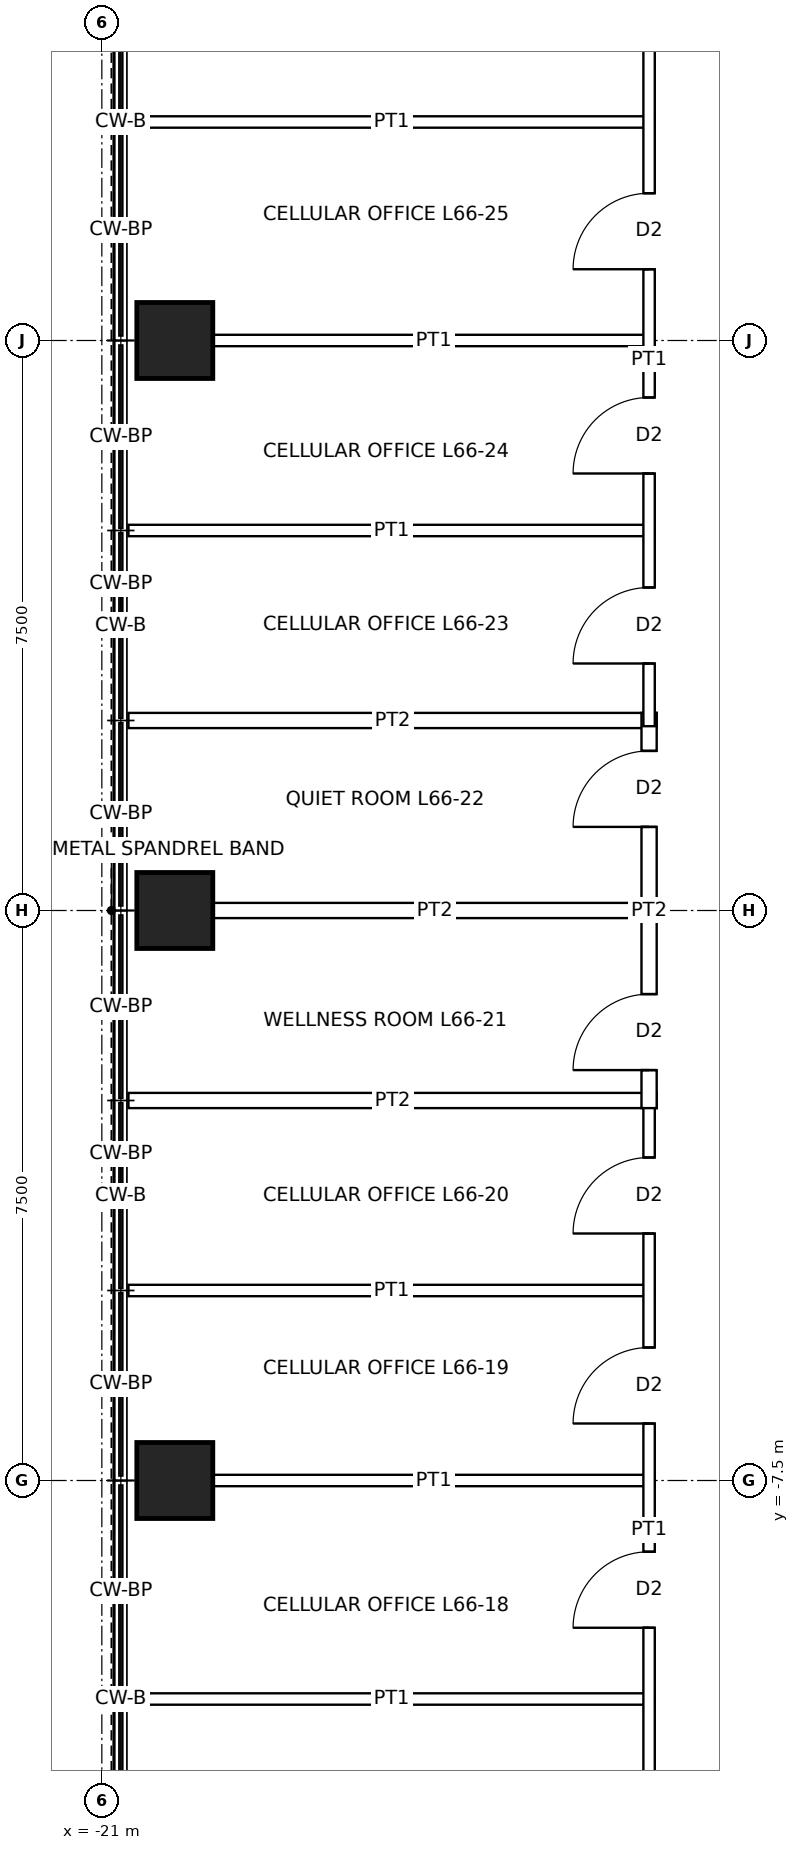
"""IFC4 building model, lengths in metres.
Left out: names, types, materials, properties, quantities, classifications, styles, units other than length and angle.
Written with IfcOpenShell. Run it as: python <this file> out.ifc"""

import sys

from ifc_helpers import new_model, si_unit, direction, frame, frame_2d, origin, origin_2d, place, context, subcontext, project, spatial, rectangle, hollow_rectangle, extrude, element, fill, save


model = new_model("IFC4")
c1 = context("Model", 3, precision=1e-05, world=origin(), true_north=direction((0.0, 1.0)))
c2 = subcontext(c1, "Body", "Model", "MODEL_VIEW")
j1 = project(units=[si_unit("LENGTHUNIT", "METRE"), si_unit("PLANEANGLEUNIT", "RADIAN")], contexts=[c1])
p1 = place(None, origin())
s1 = spatial("IfcSite", under=j1, at=p1, CompositionType="ELEMENT")
p2 = place(p1, origin())
s2 = spatial("IfcBuilding", under=s1, at=p2, CompositionType="ELEMENT")
p3 = place(p2, frame((0.0, 0.0, 299.9)))
s3 = spatial("IfcBuildingStorey", under=s2, at=p3, CompositionType="ELEMENT", Elevation=299.9)
for number, where, z_axis, x_axis in (
    (1, (-20.04, -7.5, 0.0), (0.0, 0.0, 1.0), (1.0, 0.0, 0.0)),
    (2, (-20.04, 0.0, 0.0), (0.0, 0.0, 1.0), (1.0, 0.0, 0.0)),
    (3, (-20.04, 7.5, 0.0), (0.0, 0.0, 1.0), (1.0, 0.0, 0.0)),
):
    element("IfcColumn", number, at=place(p3, frame(where, z_axis=z_axis, x_axis=x_axis)), inside=s3, PredefinedType="COLUMN", context=c2, shape_type="SweptSolid", body=[
        extrude(hollow_rectangle(XDim=1.0, YDim=1.0, WallThickness=0.075, at=origin_2d()), origin(), (0.0, 0.0, 1.0), 4.0),
    ])
p4 = place(p3, frame((-20.65, -10.375, 0.0), z_axis=(0.0, 0.0, 1.0), x_axis=(1.0, 0.0, 0.0)))
e4 = element("IfcWall", 4, at=p4, inside=s3, PredefinedType="PARTITIONING", context=c2, shape_type="SweptSolid", body=[
    extrude(rectangle(XDim=6.925, YDim=0.15, at=frame_2d((3.462, 0.0))), origin(), (0.0, 0.0, 1.0), 3.85),
])
p5 = place(p3, frame((-19.54, -7.5, 0.0), z_axis=(0.0, 0.0, 1.0), x_axis=(1.0, 0.0, 0.0)))
e5 = element("IfcWall", 5, at=p5, inside=s3, PredefinedType="PARTITIONING", context=c2, shape_type="SweptSolid", body=[
    extrude(rectangle(XDim=5.815, YDim=0.15, at=frame_2d((2.907, 0.0))), origin(), (0.0, 0.0, 1.0), 3.243),
])
p6 = place(p3, frame((-20.65, -5.0, 0.0), z_axis=(0.0, 0.0, 1.0), x_axis=(1.0, 0.0, 0.0)))
e6 = element("IfcWall", 6, at=p6, inside=s3, PredefinedType="PARTITIONING", context=c2, shape_type="SweptSolid", body=[
    extrude(rectangle(XDim=6.925, YDim=0.15, at=frame_2d((3.462, 0.0))), origin(), (0.0, 0.0, 1.0), 3.85),
])
p7 = place(p3, frame((-20.65, -2.5, 0.0), z_axis=(0.0, 0.0, 1.0), x_axis=(1.0, 0.0, 0.0)))
e7 = element("IfcWall", 7, at=p7, inside=s3, PredefinedType="PARTITIONING", context=c2, shape_type="SweptSolid", body=[
    extrude(rectangle(XDim=6.95, YDim=0.2, at=frame_2d((3.475, 0.0))), origin(), (0.0, 0.0, 1.0), 3.85),
])
p8 = place(p3, frame((-19.54, 0.0, 0.0), z_axis=(0.0, 0.0, 1.0), x_axis=(1.0, 0.0, 0.0)))
e8 = element("IfcWall", 8, at=p8, inside=s3, PredefinedType="PARTITIONING", context=c2, shape_type="SweptSolid", body=[
    extrude(rectangle(XDim=5.84, YDim=0.2, at=frame_2d((2.92, 0.0))), origin(), (0.0, 0.0, 1.0), 3.243),
])
p9 = place(p3, frame((-20.65, 2.5, 0.0), z_axis=(0.0, 0.0, 1.0), x_axis=(1.0, 0.0, 0.0)))
e9 = element("IfcWall", 9, at=p9, inside=s3, PredefinedType="PARTITIONING", context=c2, shape_type="SweptSolid", body=[
    extrude(rectangle(XDim=6.95, YDim=0.2, at=frame_2d((3.475, 0.0))), origin(), (0.0, 0.0, 1.0), 3.85),
])
p10 = place(p3, frame((-20.65, 5.0, 0.0), z_axis=(0.0, 0.0, 1.0), x_axis=(1.0, 0.0, 0.0)))
e10 = element("IfcWall", 10, at=p10, inside=s3, PredefinedType="PARTITIONING", context=c2, shape_type="SweptSolid", body=[
    extrude(rectangle(XDim=6.925, YDim=0.15, at=frame_2d((3.462, 0.0))), origin(), (0.0, 0.0, 1.0), 3.85),
])
p11 = place(p3, frame((-19.54, 7.5, 0.0), z_axis=(0.0, 0.0, 1.0), x_axis=(1.0, 0.0, 0.0)))
e11 = element("IfcWall", 11, at=p11, inside=s3, PredefinedType="PARTITIONING", context=c2, shape_type="SweptSolid", body=[
    extrude(rectangle(XDim=5.815, YDim=0.15, at=frame_2d((2.907, 0.0))), origin(), (0.0, 0.0, 1.0), 3.243),
])
p12 = place(p3, frame((-20.65, 10.375, 0.0), z_axis=(0.0, 0.0, 1.0), x_axis=(1.0, 0.0, 0.0)))
e12 = element("IfcWall", 12, at=p12, inside=s3, PredefinedType="PARTITIONING", context=c2, shape_type="SweptSolid", body=[
    extrude(rectangle(XDim=6.925, YDim=0.15, at=frame_2d((3.462, 0.0))), origin(), (0.0, 0.0, 1.0), 3.85),
])
p13 = place(p3, frame((-13.8, -13.875, 0.0), z_axis=(0.0, 0.0, 1.0), x_axis=(0.0, 1.0, 0.0)))
e13 = element("IfcWall", 13, at=p13, inside=s3, PredefinedType="PARTITIONING", context=c2, shape_type="SweptSolid", body=[
    extrude(rectangle(XDim=11.45, YDim=0.15, at=frame_2d((5.725, 0.0))), origin(), (0.0, 0.0, 1.0), 3.85),
])
p14 = place(p13, frame((4.438, 0.0, 0.0)))
e14 = element("IfcOpeningElement", 14, at=p14, cuts=e13, PredefinedType="OPENING", context=c2, shape_type="SweptSolid", body=[
    extrude(rectangle(XDim=1.0, YDim=2.1, at=frame_2d((0.5, 1.05))), frame((0.0, 0.085, 0.0), z_axis=(0.0, -1.0, 0.0), x_axis=(1.0, 0.0, 0.0)), (0.0, 0.0, 1.0), 0.17),
])
p15 = place(p13, frame((7.125, 0.0, 0.0)))
e15 = element("IfcOpeningElement", 15, at=p15, cuts=e13, PredefinedType="OPENING", context=c2, shape_type="SweptSolid", body=[
    extrude(rectangle(XDim=1.0, YDim=2.1, at=frame_2d((0.5, 1.05))), frame((0.0, 0.085, 0.0), z_axis=(0.0, -1.0, 0.0), x_axis=(1.0, 0.0, 0.0)), (0.0, 0.0, 1.0), 0.17),
])
p16 = place(p13, frame((9.625, 0.0, 0.0)))
e16 = element("IfcOpeningElement", 16, at=p16, cuts=e13, PredefinedType="OPENING", context=c2, shape_type="SweptSolid", body=[
    extrude(rectangle(XDim=1.0, YDim=2.1, at=frame_2d((0.5, 1.05))), frame((0.0, 0.085, 0.0), z_axis=(0.0, -1.0, 0.0), x_axis=(1.0, 0.0, 0.0)), (0.0, 0.0, 1.0), 0.17),
])
p17 = place(p3, frame((-13.8, -2.6, 0.0), z_axis=(0.0, 0.0, 1.0), x_axis=(0.0, 1.0, 0.0)))
e17 = element("IfcWall", 17, at=p17, inside=s3, PredefinedType="PARTITIONING", context=c2, shape_type="SweptSolid", body=[
    extrude(rectangle(XDim=5.2, YDim=0.2, at=frame_2d((2.6, 0.0))), origin(), (0.0, 0.0, 1.0), 3.85),
])
p18 = place(p17, frame((0.5, 0.0, 0.0)))
e18 = element("IfcOpeningElement", 18, at=p18, cuts=e17, PredefinedType="OPENING", context=c2, shape_type="SweptSolid", body=[
    extrude(rectangle(XDim=1.0, YDim=2.1, at=frame_2d((0.5, 1.05))), frame((0.0, 0.11, 0.0), z_axis=(0.0, -1.0, 0.0), x_axis=(1.0, 0.0, 0.0)), (0.0, 0.0, 1.0), 0.22),
])
p19 = place(p17, frame((3.7, 0.0, 0.0)))
e19 = element("IfcOpeningElement", 19, at=p19, cuts=e17, PredefinedType="OPENING", context=c2, shape_type="SweptSolid", body=[
    extrude(rectangle(XDim=1.0, YDim=2.1, at=frame_2d((0.5, 1.05))), frame((0.0, 0.11, 0.0), z_axis=(0.0, -1.0, 0.0), x_axis=(1.0, 0.0, 0.0)), (0.0, 0.0, 1.0), 0.22),
])
p20 = place(p3, frame((-13.8, 2.425, 0.0), z_axis=(0.0, 0.0, 1.0), x_axis=(0.0, 1.0, 0.0)))
e20 = element("IfcWall", 20, at=p20, inside=s3, PredefinedType="PARTITIONING", context=c2, shape_type="SweptSolid", body=[
    extrude(rectangle(XDim=9.65, YDim=0.15, at=frame_2d((4.825, 0.0))), origin(), (0.0, 0.0, 1.0), 3.85),
])
p21 = place(p20, frame((0.825, 0.0, 0.0)))
e21 = element("IfcOpeningElement", 21, at=p21, cuts=e20, PredefinedType="OPENING", context=c2, shape_type="SweptSolid", body=[
    extrude(rectangle(XDim=1.0, YDim=2.1, at=frame_2d((0.5, 1.05))), frame((0.0, 0.085, 0.0), z_axis=(0.0, -1.0, 0.0), x_axis=(1.0, 0.0, 0.0)), (0.0, 0.0, 1.0), 0.17),
])
p22 = place(p20, frame((3.325, 0.0, 0.0)))
e22 = element("IfcOpeningElement", 22, at=p22, cuts=e20, PredefinedType="OPENING", context=c2, shape_type="SweptSolid", body=[
    extrude(rectangle(XDim=1.0, YDim=2.1, at=frame_2d((0.5, 1.05))), frame((0.0, 0.085, 0.0), z_axis=(0.0, -1.0, 0.0), x_axis=(1.0, 0.0, 0.0)), (0.0, 0.0, 1.0), 0.17),
])
p23 = place(p20, frame((6.012, 0.0, 0.0)))
e23 = element("IfcOpeningElement", 23, at=p23, cuts=e20, PredefinedType="OPENING", context=c2, shape_type="SweptSolid", body=[
    extrude(rectangle(XDim=1.0, YDim=2.1, at=frame_2d((0.5, 1.05))), frame((0.0, 0.085, 0.0), z_axis=(0.0, -1.0, 0.0), x_axis=(1.0, 0.0, 0.0)), (0.0, 0.0, 1.0), 0.17),
])
p24 = place(p14, origin())
e24 = element("IfcDoor", 24, at=p24, inside=s3, OperationType="SINGLE_SWING_LEFT", PredefinedType="DOOR", context=c2, shape_type="SweptSolid", body=[
    extrude(rectangle(XDim=1.0, YDim=2.1, at=frame_2d((0.5, 1.05))), frame((0.0, 0.025, 0.0), z_axis=(0.0, -1.0, 0.0), x_axis=(1.0, 0.0, 0.0)), (0.0, 0.0, 1.0), 0.05),
])
fill(e14, e24)
p25 = place(p15, origin())
e25 = element("IfcDoor", 25, at=p25, inside=s3, OperationType="SINGLE_SWING_LEFT", PredefinedType="DOOR", context=c2, shape_type="SweptSolid", body=[
    extrude(rectangle(XDim=1.0, YDim=2.1, at=frame_2d((0.5, 1.05))), frame((0.0, 0.025, 0.0), z_axis=(0.0, -1.0, 0.0), x_axis=(1.0, 0.0, 0.0)), (0.0, 0.0, 1.0), 0.05),
])
fill(e15, e25)
p26 = place(p16, origin())
e26 = element("IfcDoor", 26, at=p26, inside=s3, OperationType="SINGLE_SWING_LEFT", PredefinedType="DOOR", context=c2, shape_type="SweptSolid", body=[
    extrude(rectangle(XDim=1.0, YDim=2.1, at=frame_2d((0.5, 1.05))), frame((0.0, 0.025, 0.0), z_axis=(0.0, -1.0, 0.0), x_axis=(1.0, 0.0, 0.0)), (0.0, 0.0, 1.0), 0.05),
])
fill(e16, e26)
p27 = place(p18, origin())
e27 = element("IfcDoor", 27, at=p27, inside=s3, OperationType="SINGLE_SWING_LEFT", PredefinedType="DOOR", context=c2, shape_type="SweptSolid", body=[
    extrude(rectangle(XDim=1.0, YDim=2.1, at=frame_2d((0.5, 1.05))), frame((0.0, 0.025, 0.0), z_axis=(0.0, -1.0, 0.0), x_axis=(1.0, 0.0, 0.0)), (0.0, 0.0, 1.0), 0.05),
])
fill(e18, e27)
p28 = place(p19, origin())
e28 = element("IfcDoor", 28, at=p28, inside=s3, OperationType="SINGLE_SWING_LEFT", PredefinedType="DOOR", context=c2, shape_type="SweptSolid", body=[
    extrude(rectangle(XDim=1.0, YDim=2.1, at=frame_2d((0.5, 1.05))), frame((0.0, 0.025, 0.0), z_axis=(0.0, -1.0, 0.0), x_axis=(1.0, 0.0, 0.0)), (0.0, 0.0, 1.0), 0.05),
])
fill(e19, e28)
p29 = place(p21, origin())
e29 = element("IfcDoor", 29, at=p29, inside=s3, OperationType="SINGLE_SWING_LEFT", PredefinedType="DOOR", context=c2, shape_type="SweptSolid", body=[
    extrude(rectangle(XDim=1.0, YDim=2.1, at=frame_2d((0.5, 1.05))), frame((0.0, 0.025, 0.0), z_axis=(0.0, -1.0, 0.0), x_axis=(1.0, 0.0, 0.0)), (0.0, 0.0, 1.0), 0.05),
])
fill(e21, e29)
p30 = place(p22, origin())
e30 = element("IfcDoor", 30, at=p30, inside=s3, OperationType="SINGLE_SWING_LEFT", PredefinedType="DOOR", context=c2, shape_type="SweptSolid", body=[
    extrude(rectangle(XDim=1.0, YDim=2.1, at=frame_2d((0.5, 1.05))), frame((0.0, 0.025, 0.0), z_axis=(0.0, -1.0, 0.0), x_axis=(1.0, 0.0, 0.0)), (0.0, 0.0, 1.0), 0.05),
])
fill(e22, e30)
p31 = place(p23, origin())
e31 = element("IfcDoor", 31, at=p31, inside=s3, OperationType="SINGLE_SWING_LEFT", PredefinedType="DOOR", context=c2, shape_type="SweptSolid", body=[
    extrude(rectangle(XDim=1.0, YDim=2.1, at=frame_2d((0.5, 1.05))), frame((0.0, 0.025, 0.0), z_axis=(0.0, -1.0, 0.0), x_axis=(1.0, 0.0, 0.0)), (0.0, 0.0, 1.0), 0.05),
])
fill(e23, e31)
save(model, sys.argv[1])
